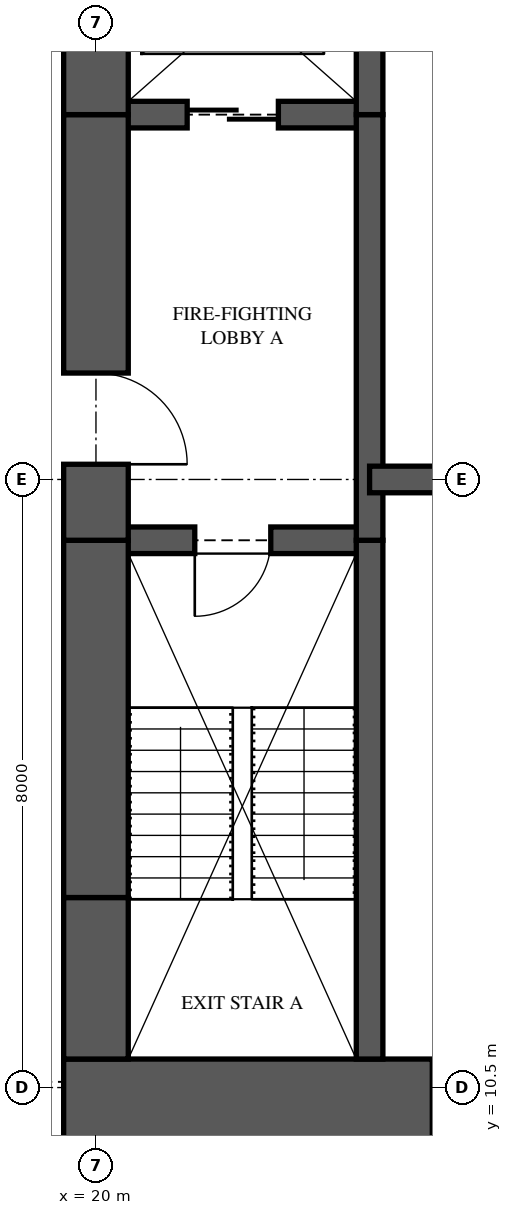
"""IFC4 building model, lengths in metres.
Left out: names, types, materials, properties, quantities, classifications, styles, units other than length and angle.
Written with IfcOpenShell. Run it as: python <this file> out.ifc"""

import sys

from ifc_helpers import new_model, si_unit, direction, frame, frame_2d, origin, place, context, subcontext, project, spatial, rectangle, extrude, element, fill, save


model = new_model("IFC4")
c1 = context("Model", 3, precision=1e-05, world=origin(), true_north=direction((0.0, 1.0)))
c2 = subcontext(c1, "Body", "Model", "MODEL_VIEW")
j1 = project(units=[si_unit("LENGTHUNIT", "METRE"), si_unit("PLANEANGLEUNIT", "RADIAN")], contexts=[c1])
p1 = place(None, origin())
s1 = spatial("IfcSite", under=j1, at=p1, CompositionType="ELEMENT")
p2 = place(p1, origin())
s2 = spatial("IfcBuilding", under=s1, at=p2, CompositionType="ELEMENT")
p3 = place(p2, frame((0.0, 0.0, 91.45)))
s3 = spatial("IfcBuildingStorey", under=s2, at=p3, CompositionType="ELEMENT", Elevation=91.45)
p4 = place(p3, frame((19.575, 10.125, 0.0), z_axis=(0.0, 0.0, 1.0), x_axis=(1.0, 0.0, 0.0)))
e1 = element("IfcWall", 1, at=p4, inside=s3, PredefinedType="SHEAR", context=c2, shape_type="SweptSolid", body=[
    extrude(rectangle(XDim=6.425, YDim=1.5, at=frame_2d((3.212, 0.0))), origin(), (0.0, 0.0, 1.0), 3.35),
])
p5 = place(p4, frame((4.85, 0.0, 0.0)))
e2 = element("IfcOpeningElement", 2, at=p5, cuts=e1, PredefinedType="OPENING", context=c2, shape_type="SweptSolid", body=[
    extrude(rectangle(XDim=0.75, YDim=2.1, at=frame_2d((0.375, 1.05))), frame((0.0, 0.76, 0.0), z_axis=(0.0, -1.0, 0.0), x_axis=(1.0, 0.0, 0.0)), (0.0, 0.0, 1.0), 1.52),
])
p6 = place(p3, frame((20.0, 26.125, 0.0), z_axis=(0.0, 0.0, 1.0), x_axis=(0.0, -1.0, 0.0)))
e3 = element("IfcWall", 3, at=p6, inside=s3, PredefinedType="SHEAR", context=c2, shape_type="SweptSolid", body=[
    extrude(rectangle(XDim=2.825, YDim=0.85, at=frame_2d((1.413, 0.0))), origin(), (0.0, 0.0, 1.0), 3.35),
])
p7 = place(p3, frame((20.0, 23.3, 0.0), z_axis=(0.0, 0.0, 1.0), x_axis=(0.0, -1.0, 0.0)))
e4 = element("IfcWall", 4, at=p7, inside=s3, PredefinedType="SHEAR", context=c2, shape_type="SweptSolid", body=[
    extrude(rectangle(XDim=5.6, YDim=0.85, at=frame_2d((2.8, 0.0))), origin(), (0.0, 0.0, 1.0), 3.35),
])
p8 = place(p7, frame((3.4, 0.0, 0.0)))
e5 = element("IfcOpeningElement", 5, at=p8, cuts=e4, PredefinedType="OPENING", context=c2, shape_type="SweptSolid", body=[
    extrude(rectangle(XDim=1.2, YDim=2.2, at=frame_2d((0.6, 1.1))), frame((0.0, 0.435, 0.0), z_axis=(0.0, -1.0, 0.0), x_axis=(1.0, 0.0, 0.0)), (0.0, 0.0, 1.0), 0.87),
])
p9 = place(p3, frame((20.0, 17.7, 0.0), z_axis=(0.0, 0.0, 1.0), x_axis=(0.0, -1.0, 0.0)))
e6 = element("IfcWall", 6, at=p9, inside=s3, PredefinedType="SHEAR", context=c2, shape_type="SweptSolid", body=[
    extrude(rectangle(XDim=4.7, YDim=0.85, at=frame_2d((2.35, 0.0))), origin(), (0.0, 0.0, 1.0), 3.35),
])
p10 = place(p3, frame((20.0, 13.0, 0.0), z_axis=(0.0, 0.0, 1.0), x_axis=(0.0, -1.0, 0.0)))
e7 = element("IfcWall", 7, at=p10, inside=s3, PredefinedType="SHEAR", context=c2, shape_type="SweptSolid", body=[
    extrude(rectangle(XDim=2.125, YDim=0.85, at=frame_2d((1.062, 0.0))), origin(), (0.0, 0.0, 1.0), 3.35),
])
p11 = place(p3, frame((23.6, 10.875, 0.0), z_axis=(0.0, 0.0, 1.0), x_axis=(0.0, 1.0, 0.0)))
e8 = element("IfcWall", 8, at=p11, inside=s3, PredefinedType="SHEAR", context=c2, shape_type="SweptSolid", body=[
    extrude(rectangle(XDim=6.825, YDim=0.35, at=frame_2d((3.413, 0.0))), origin(), (0.0, 0.0, 1.0), 3.35),
])
p12 = place(p3, frame((23.6, 17.7, 0.0), z_axis=(0.0, 0.0, 1.0), x_axis=(0.0, 1.0, 0.0)))
e9 = element("IfcWall", 9, at=p12, inside=s3, PredefinedType="SHEAR", context=c2, shape_type="SweptSolid", body=[
    extrude(rectangle(XDim=5.6, YDim=0.35, at=frame_2d((2.8, 0.0))), origin(), (0.0, 0.0, 1.0), 3.35),
])
p13 = place(p3, frame((23.6, 23.3, 0.0), z_axis=(0.0, 0.0, 1.0), x_axis=(0.0, 1.0, 0.0)))
e10 = element("IfcWall", 10, at=p13, inside=s3, PredefinedType="SHEAR", context=c2, shape_type="SweptSolid", body=[
    extrude(rectangle(XDim=2.825, YDim=0.35, at=frame_2d((1.413, 0.0))), origin(), (0.0, 0.0, 1.0), 3.35),
])
p14 = place(p3, frame((20.0, 17.7, 0.0), z_axis=(0.0, 0.0, 1.0), x_axis=(1.0, 0.0, 0.0)))
e11 = element("IfcWall", 11, at=p14, inside=s3, PredefinedType="SHEAR", context=c2, shape_type="SweptSolid", body=[
    extrude(rectangle(XDim=3.6, YDim=0.35, at=frame_2d((1.8, 0.0))), origin(), (0.0, 0.0, 1.0), 3.35),
])
p15 = place(p14, frame((1.3, 0.0, 0.0)))
e12 = element("IfcOpeningElement", 12, at=p15, cuts=e11, PredefinedType="OPENING", context=c2, shape_type="SweptSolid", body=[
    extrude(rectangle(XDim=1.0, YDim=2.1, at=frame_2d((0.5, 1.05))), frame((0.0, 0.185, 0.0), z_axis=(0.0, -1.0, 0.0), x_axis=(1.0, 0.0, 0.0)), (0.0, 0.0, 1.0), 0.37),
])
p16 = place(p3, frame((20.0, 23.3, 0.0), z_axis=(0.0, 0.0, 1.0), x_axis=(1.0, 0.0, 0.0)))
e13 = element("IfcWall", 13, at=p16, inside=s3, PredefinedType="SHEAR", context=c2, shape_type="SweptSolid", body=[
    extrude(rectangle(XDim=3.6, YDim=0.35, at=frame_2d((1.8, 0.0))), origin(), (0.0, 0.0, 1.0), 3.35),
])
p17 = place(p16, frame((1.2, 0.0, 0.0)))
e14 = element("IfcOpeningElement", 14, at=p17, cuts=e13, PredefinedType="OPENING", context=c2, shape_type="SweptSolid", body=[
    extrude(rectangle(XDim=1.2, YDim=2.1, at=frame_2d((0.6, 1.05))), frame((0.0, 0.185, 0.0), z_axis=(0.0, -1.0, 0.0), x_axis=(1.0, 0.0, 0.0)), (0.0, 0.0, 1.0), 0.37),
])
p18 = place(p3, frame((23.6, 18.5, 0.0), z_axis=(0.0, 0.0, 1.0), x_axis=(1.0, 0.0, 0.0)))
e15 = element("IfcWall", 15, at=p18, inside=s3, PredefinedType="SHEAR", context=c2, shape_type="SweptSolid", body=[
    extrude(rectangle(XDim=2.4, YDim=0.35, at=frame_2d((1.2, 0.0))), origin(), (0.0, 0.0, 1.0), 3.35),
])
p19 = place(p15, frame((1.0, 0.0, 0.0), z_axis=(0.0, 0.0, 1.0), x_axis=(-1.0, 0.0, 0.0)))
e16 = element("IfcDoor", 16, at=p19, inside=s3, OperationType="SINGLE_SWING_RIGHT", PredefinedType="DOOR", context=c2, shape_type="SweptSolid", body=[
    extrude(rectangle(XDim=1.0, YDim=2.1, at=frame_2d((0.5, 1.05))), frame((0.0, 0.025, 0.0), z_axis=(0.0, -1.0, 0.0), x_axis=(1.0, 0.0, 0.0)), (0.0, 0.0, 1.0), 0.05),
])
fill(e12, e16)
p20 = place(p8, origin())
e17 = element("IfcDoor", 17, at=p20, inside=s3, OperationType="SINGLE_SWING_RIGHT", PredefinedType="DOOR", context=c2, shape_type="SweptSolid", body=[
    extrude(rectangle(XDim=1.2, YDim=2.2, at=frame_2d((0.6, 1.1))), frame((0.0, 0.025, 0.0), z_axis=(0.0, -1.0, 0.0), x_axis=(1.0, 0.0, 0.0)), (0.0, 0.0, 1.0), 0.05),
])
fill(e5, e17)
p21 = place(p17, origin())
e18 = element("IfcDoor", 18, at=p21, inside=s3, OperationType="SLIDING_TO_LEFT", PredefinedType="DOOR", context=c2, shape_type="SweptSolid", body=[
    extrude(rectangle(XDim=1.2, YDim=2.1, at=frame_2d((0.6, 1.05))), frame((0.0, 0.025, 0.0), z_axis=(0.0, -1.0, 0.0), x_axis=(1.0, 0.0, 0.0)), (0.0, 0.0, 1.0), 0.05),
])
fill(e14, e18)
save(model, sys.argv[1])
